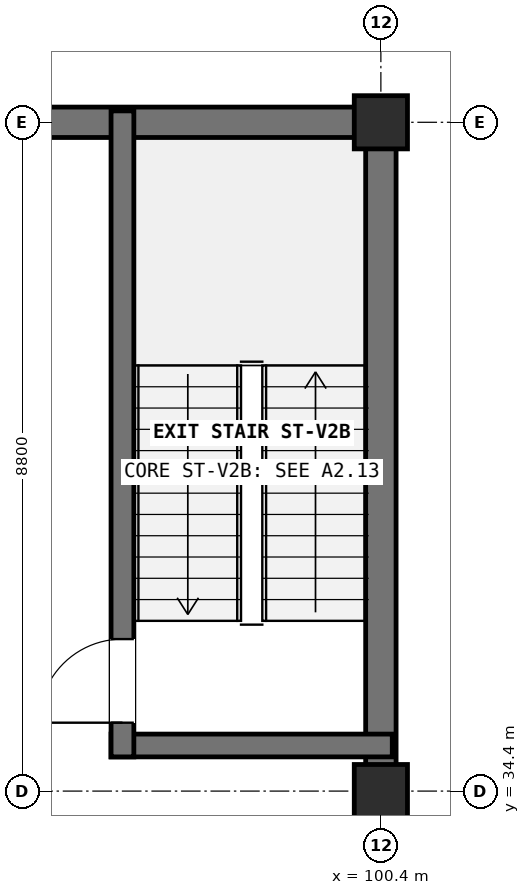
"""IFC4 building model, lengths in metres.
Left out: names, types, materials, properties, quantities, classifications, styles, units other than length and angle.
Written with IfcOpenShell. Run it as: python <this file> out.ifc"""

import sys

from ifc_helpers import new_model, si_unit, direction, frame, frame_2d, origin, origin_2d, place, context, subcontext, project, spatial, rectangle, extrude, element, fill, save


model = new_model("IFC4")
c1 = context("Model", 3, precision=1e-05, world=origin(), true_north=direction((0.0, 1.0)))
c2 = subcontext(c1, "Body", "Model", "MODEL_VIEW")
j1 = project(units=[si_unit("LENGTHUNIT", "METRE"), si_unit("PLANEANGLEUNIT", "RADIAN")], contexts=[c1])
p1 = place(None, origin())
s1 = spatial("IfcSite", under=j1, at=p1, CompositionType="ELEMENT")
p2 = place(p1, origin())
s2 = spatial("IfcBuilding", under=s1, at=p2, CompositionType="ELEMENT")
p3 = place(p2, frame((0.0, 0.0, -4.5)))
s3 = spatial("IfcBuildingStorey", under=s2, at=p3, CompositionType="ELEMENT", Elevation=-4.5)
for number, where, z_axis, x_axis in (
    (1, (100.4, 34.4, 0.0), (0.0, 0.0, 1.0), (1.0, 0.0, 0.0)),
    (2, (100.4, 43.2, 0.0), (0.0, 0.0, 1.0), (1.0, 0.0, 0.0)),
):
    element("IfcColumn", number, at=place(p3, frame(where, z_axis=z_axis, x_axis=x_axis)), inside=s3, PredefinedType="COLUMN", context=c2, shape_type="SweptSolid", body=[
        extrude(rectangle(XDim=0.7, YDim=0.7, at=origin_2d()), origin(), (0.0, 0.0, 1.0), 4.5),
    ])
p4 = place(p3, frame((100.4, 16.6, 0.0), z_axis=(0.0, 0.0, 1.0), x_axis=(0.0, 1.0, 0.0)))
e3 = element("IfcWall", 3, at=p4, inside=s3, PredefinedType="USERDEFINED", context=c2, shape_type="SweptSolid", body=[
    extrude(rectangle(XDim=26.8, YDim=0.4, at=frame_2d((13.4, 0.0))), origin(), (0.0, 0.0, 1.0), 4.5),
])
p5 = place(p3, frame((100.6, 43.2, 0.0), z_axis=(0.0, 0.0, 1.0), x_axis=(-1.0, 0.0, 0.0)))
e4 = element("IfcWall", 4, at=p5, inside=s3, PredefinedType="USERDEFINED", context=c2, shape_type="SweptSolid", body=[
    extrude(rectangle(XDim=42.4, YDim=0.4, at=frame_2d((21.2, 0.0))), origin(), (0.0, 0.0, 1.0), 4.5),
])
p6 = place(p3, frame((96.85, 35.0, 0.0), z_axis=(0.0, 0.0, 1.0), x_axis=(1.0, 0.0, 0.0)))
e5 = element("IfcWall", 5, at=p6, inside=s3, PredefinedType="SHEAR", context=c2, shape_type="SweptSolid", body=[
    extrude(rectangle(XDim=3.7, YDim=0.3, at=frame_2d((1.85, 0.0))), origin(), (0.0, 0.0, 1.0), 4.5),
])
p7 = place(p3, frame((97.0, 34.85, 0.0), z_axis=(0.0, 0.0, 1.0), x_axis=(0.0, 1.0, 0.0)))
e6 = element("IfcWall", 6, at=p7, inside=s3, PredefinedType="SHEAR", context=c2, shape_type="SweptSolid", body=[
    extrude(rectangle(XDim=8.5, YDim=0.3, at=frame_2d((4.25, 0.0))), origin(), (0.0, 0.0, 1.0), 4.5),
])
p8 = place(p7, frame((0.45, 0.0, 0.0)))
e7 = element("IfcOpeningElement", 7, at=p8, cuts=e6, PredefinedType="OPENING", context=c2, shape_type="SweptSolid", body=[
    extrude(rectangle(XDim=1.1, YDim=2.2, at=frame_2d((0.55, 1.1))), frame((0.0, 0.16, 0.0), z_axis=(0.0, -1.0, 0.0), x_axis=(1.0, 0.0, 0.0)), (0.0, 0.0, 1.0), 0.32),
])
p9 = place(p8, origin())
e8 = element("IfcDoor", 8, at=p9, inside=s3, OperationType="SINGLE_SWING_LEFT", PredefinedType="DOOR", context=c2, shape_type="SweptSolid", body=[
    extrude(rectangle(XDim=1.1, YDim=2.2, at=frame_2d((0.55, 1.1))), frame((0.0, 0.025, 0.0), z_axis=(0.0, -1.0, 0.0), x_axis=(1.0, 0.0, 0.0)), (0.0, 0.0, 1.0), 0.05),
])
fill(e7, e8)
save(model, sys.argv[1])
